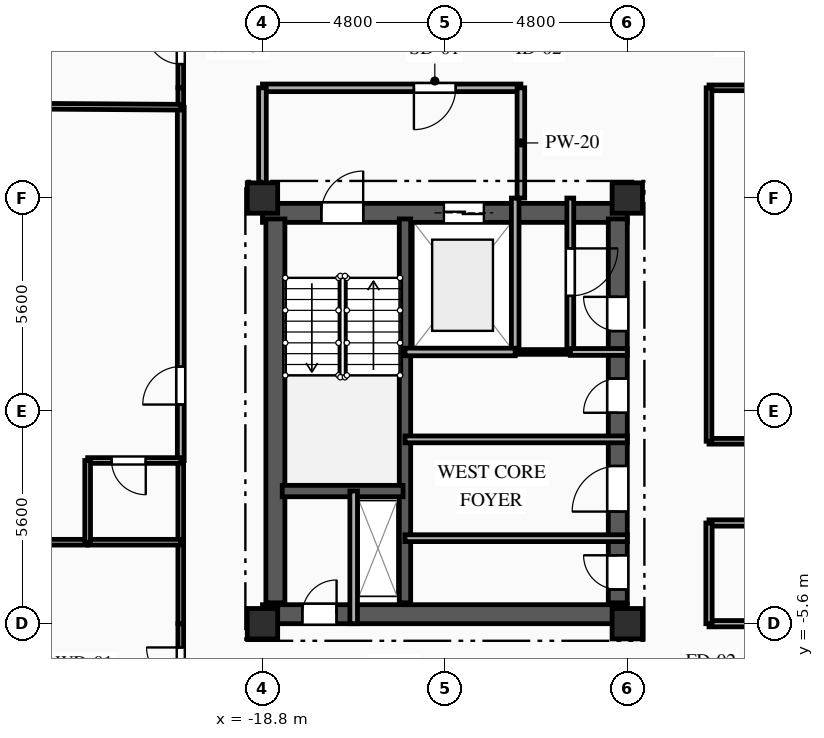
"""IFC4 building model, lengths in metres.
Left out: names, types, materials, properties, quantities, classifications, styles, units other than length and angle.
Written with IfcOpenShell. Run it as: python <this file> out.ifc"""

import sys

from ifc_helpers import new_model, si_unit, direction, frame, frame_2d, origin, origin_2d, place, context, subcontext, project, spatial, rectangle, extrude, element, fill, save


model = new_model("IFC4")
c1 = context("Model", 3, precision=1e-05, world=origin(), true_north=direction((0.0, 1.0)))
c2 = subcontext(c1, "Body", "Model", "MODEL_VIEW")
j1 = project(units=[si_unit("LENGTHUNIT", "METRE"), si_unit("PLANEANGLEUNIT", "RADIAN")], contexts=[c1])
p1 = place(None, origin())
s1 = spatial("IfcSite", under=j1, at=p1, CompositionType="ELEMENT")
p2 = place(p1, origin())
s2 = spatial("IfcBuilding", under=s1, at=p2, CompositionType="ELEMENT")
p3 = place(p2, frame((0.0, 0.0, 216.5)))
s3 = spatial("IfcBuildingStorey", under=s2, at=p3, CompositionType="ELEMENT", Elevation=216.5)
for number, where, z_axis, x_axis in (
    (1, (-18.8, -5.6, 0.0), (0.0, 0.0, 1.0), (1.0, 0.0, 0.0)),
    (2, (-18.8, 5.6, 0.0), (0.0, 0.0, 1.0), (1.0, 0.0, 0.0)),
    (3, (-9.2, -5.6, 0.0), (0.0, 0.0, 1.0), (1.0, 0.0, 0.0)),
    (4, (-9.2, 5.6, 0.0), (0.0, 0.0, 1.0), (1.0, 0.0, 0.0)),
):
    element("IfcColumn", number, at=place(p3, frame(where, z_axis=z_axis, x_axis=x_axis)), inside=s3, PredefinedType="COLUMN", context=c2, shape_type="SweptSolid", body=[
        extrude(rectangle(XDim=0.8, YDim=0.8, at=origin_2d()), origin(), (0.0, 0.0, 1.0), 3.35),
    ])
p4 = place(p3, frame((-18.8, 5.21, 0.0), z_axis=(0.0, 0.0, 1.0), x_axis=(1.0, 0.0, 0.0)))
e5 = element("IfcWall", 5, at=p4, inside=s3, PredefinedType="SHEAR", context=c2, shape_type="SweptSolid", body=[
    extrude(rectangle(XDim=9.6, YDim=0.5, at=frame_2d((4.8, 0.0))), origin(), (0.0, 0.0, 1.0), 3.04),
])
p5 = place(p4, frame((1.55, 0.0, 0.0)))
e6 = element("IfcOpeningElement", 6, at=p5, cuts=e5, PredefinedType="OPENING", context=c2, shape_type="SweptSolid", body=[
    extrude(rectangle(XDim=1.1, YDim=2.15, at=frame_2d((0.55, 1.075))), frame((0.0, 0.26, 0.0), z_axis=(0.0, -1.0, 0.0), x_axis=(1.0, 0.0, 0.0)), (0.0, 0.0, 1.0), 0.52),
])
p6 = place(p4, frame((4.775, 0.0, 0.0)))
e7 = element("IfcOpeningElement", 7, at=p6, cuts=e5, PredefinedType="OPENING", context=c2, shape_type="SweptSolid", body=[
    extrude(rectangle(XDim=1.05, YDim=2.1, at=frame_2d((0.525, 1.05))), frame((0.0, 0.26, 0.0), z_axis=(0.0, -1.0, 0.0), x_axis=(1.0, 0.0, 0.0)), (0.0, 0.0, 1.0), 0.52),
])
p7 = place(p3, frame((-18.8, -5.35, 0.0), z_axis=(0.0, 0.0, 1.0), x_axis=(1.0, 0.0, 0.0)))
e8 = element("IfcWall", 8, at=p7, inside=s3, PredefinedType="SHEAR", context=c2, shape_type="SweptSolid", body=[
    extrude(rectangle(XDim=9.6, YDim=0.5, at=frame_2d((4.8, 0.0))), origin(), (0.0, 0.0, 1.0), 3.04),
])
p8 = place(p7, frame((1.05, 0.0, 0.0)))
e9 = element("IfcOpeningElement", 9, at=p8, cuts=e8, PredefinedType="OPENING", context=c2, shape_type="SweptSolid", body=[
    extrude(rectangle(XDim=0.9, YDim=2.1, at=frame_2d((0.45, 1.05))), frame((0.0, 0.26, 0.0), z_axis=(0.0, -1.0, 0.0), x_axis=(1.0, 0.0, 0.0)), (0.0, 0.0, 1.0), 0.52),
])
p9 = place(p3, frame((-18.46, -5.05, 0.0), z_axis=(0.0, 0.0, 1.0), x_axis=(0.0, 1.0, 0.0)))
e10 = element("IfcWall", 10, at=p9, inside=s3, PredefinedType="SHEAR", context=c2, shape_type="SweptSolid", body=[
    extrude(rectangle(XDim=10.1, YDim=0.5, at=frame_2d((5.05, 0.0))), origin(), (0.0, 0.0, 1.0), 3.04),
])
p10 = place(p3, frame((-9.45, -5.05, 0.0), z_axis=(0.0, 0.0, 1.0), x_axis=(0.0, 1.0, 0.0)))
e11 = element("IfcWall", 11, at=p10, inside=s3, PredefinedType="SHEAR", context=c2, shape_type="SweptSolid", body=[
    extrude(rectangle(XDim=10.1, YDim=0.5, at=frame_2d((5.05, 0.0))), origin(), (0.0, 0.0, 1.0), 3.04),
])
p11 = place(p10, frame((7.15, 0.0, 0.0)))
e12 = element("IfcOpeningElement", 12, at=p11, cuts=e11, PredefinedType="OPENING", context=c2, shape_type="SweptSolid", body=[
    extrude(rectangle(XDim=0.9, YDim=2.1, at=frame_2d((0.45, 1.05))), frame((0.0, 0.26, 0.0), z_axis=(0.0, -1.0, 0.0), x_axis=(1.0, 0.0, 0.0)), (0.0, 0.0, 1.0), 0.52),
])
p12 = place(p10, frame((2.4, 0.0, 0.0)))
e13 = element("IfcOpeningElement", 13, at=p12, cuts=e11, PredefinedType="OPENING", context=c2, shape_type="SweptSolid", body=[
    extrude(rectangle(XDim=1.2, YDim=2.15, at=frame_2d((0.6, 1.075))), frame((0.0, 0.26, 0.0), z_axis=(0.0, -1.0, 0.0), x_axis=(1.0, 0.0, 0.0)), (0.0, 0.0, 1.0), 0.52),
])
p13 = place(p10, frame((0.35, 0.0, 0.0)))
e14 = element("IfcOpeningElement", 14, at=p13, cuts=e11, PredefinedType="OPENING", context=c2, shape_type="SweptSolid", body=[
    extrude(rectangle(XDim=0.9, YDim=2.1, at=frame_2d((0.45, 1.05))), frame((0.0, 0.26, 0.0), z_axis=(0.0, -1.0, 0.0), x_axis=(1.0, 0.0, 0.0)), (0.0, 0.0, 1.0), 0.52),
])
p14 = place(p10, frame((5.0, 0.0, 0.0)))
e15 = element("IfcOpeningElement", 15, at=p14, cuts=e11, PredefinedType="OPENING", context=c2, shape_type="SweptSolid", body=[
    extrude(rectangle(XDim=0.9, YDim=2.1, at=frame_2d((0.45, 1.05))), frame((0.0, 0.26, 0.0), z_axis=(0.0, -1.0, 0.0), x_axis=(1.0, 0.0, 0.0)), (0.0, 0.0, 1.0), 0.52),
])
p15 = place(p3, frame((-15.05, -5.05, 0.0), z_axis=(0.0, 0.0, 1.0), x_axis=(0.0, 1.0, 0.0)))
e16 = element("IfcWall", 16, at=p15, inside=s3, PredefinedType="SHEAR", context=c2, shape_type="SweptSolid", body=[
    extrude(rectangle(XDim=10.1, YDim=0.3, at=frame_2d((5.05, 0.0))), origin(), (0.0, 0.0, 1.0), 3.04),
])
p16 = place(p3, frame((-18.28, -2.11, 0.0), z_axis=(0.0, 0.0, 1.0), x_axis=(1.0, 0.0, 0.0)))
e17 = element("IfcWall", 17, at=p16, inside=s3, PredefinedType="SHEAR", context=c2, shape_type="SweptSolid", body=[
    extrude(rectangle(XDim=3.18, YDim=0.3, at=frame_2d((1.59, 0.0))), origin(), (0.0, 0.0, 1.0), 3.04),
])
p17 = place(p3, frame((-16.4, -5.6, 0.0), z_axis=(0.0, 0.0, 1.0), x_axis=(0.0, 1.0, 0.0)))
e18 = element("IfcWall", 18, at=p17, inside=s3, PredefinedType="PARTITIONING", context=c2, shape_type="SweptSolid", body=[
    extrude(rectangle(XDim=3.49, YDim=0.2, at=frame_2d((1.745, 0.0))), origin(), (0.0, 0.0, 1.0), 3.04),
])
p18 = place(p3, frame((-12.15, 1.55, 0.0), z_axis=(0.0, 0.0, 1.0), x_axis=(0.0, 1.0, 0.0)))
e19 = element("IfcWall", 19, at=p18, inside=s3, PredefinedType="PARTITIONING", context=c2, shape_type="SweptSolid", body=[
    extrude(rectangle(XDim=4.05, YDim=0.2, at=frame_2d((2.025, 0.0))), origin(), (0.0, 0.0, 1.0), 3.04),
])
p19 = place(p3, frame((-12.0, 8.5, 0.0), z_axis=(0.0, 0.0, 1.0), x_axis=(-1.0, 0.0, 0.0)))
e20 = element("IfcWall", 20, at=p19, inside=s3, PredefinedType="PARTITIONING", context=c2, shape_type="SweptSolid", body=[
    extrude(rectangle(XDim=6.8, YDim=0.2, at=frame_2d((3.4, 0.0))), origin(), (0.0, 0.0, 1.0), 3.04),
])
p20 = place(p19, frame((1.715, 0.0, 0.0)))
e21 = element("IfcOpeningElement", 21, at=p20, cuts=e20, PredefinedType="OPENING", context=c2, shape_type="SweptSolid", body=[
    extrude(rectangle(XDim=1.1, YDim=2.15, at=frame_2d((0.55, 1.075))), frame((0.0, 0.11, 0.0), z_axis=(0.0, -1.0, 0.0), x_axis=(1.0, 0.0, 0.0)), (0.0, 0.0, 1.0), 0.22),
])
p21 = place(p3, frame((-18.8, 8.5, 0.0), z_axis=(0.0, 0.0, 1.0), x_axis=(0.0, -1.0, 0.0)))
e22 = element("IfcWall", 22, at=p21, inside=s3, PredefinedType="PARTITIONING", context=c2, shape_type="SweptSolid", body=[
    extrude(rectangle(XDim=2.9, YDim=0.2, at=frame_2d((1.45, 0.0))), origin(), (0.0, 0.0, 1.0), 2.665),
])
p22 = place(p3, frame((-12.0, 5.6, 0.0), z_axis=(0.0, 0.0, 1.0), x_axis=(0.0, 1.0, 0.0)))
e23 = element("IfcWall", 23, at=p22, inside=s3, PredefinedType="PARTITIONING", context=c2, shape_type="SweptSolid", body=[
    extrude(rectangle(XDim=2.9, YDim=0.2, at=frame_2d((1.45, 0.0))), origin(), (0.0, 0.0, 1.0), 3.04),
])
p23 = place(p3, frame((-10.7, 5.6, 0.0), z_axis=(0.0, 0.0, 1.0), x_axis=(0.0, -1.0, 0.0)))
e24 = element("IfcWall", 24, at=p23, inside=s3, PredefinedType="PARTITIONING", context=c2, shape_type="SweptSolid", body=[
    extrude(rectangle(XDim=4.05, YDim=0.18, at=frame_2d((2.025, 0.0))), origin(), (0.0, 0.0, 1.0), 3.04),
])
p24 = place(p23, frame((1.325, 0.0, 0.0)))
e25 = element("IfcOpeningElement", 25, at=p24, cuts=e24, PredefinedType="OPENING", context=c2, shape_type="SweptSolid", body=[
    extrude(rectangle(XDim=1.25, YDim=2.2, at=frame_2d((0.625, 1.1))), frame((0.0, 0.1, 0.0), z_axis=(0.0, -1.0, 0.0), x_axis=(1.0, 0.0, 0.0)), (0.0, 0.0, 1.0), 0.2),
])
p25 = place(p3, frame((-10.7, 1.55, 0.0), z_axis=(0.0, 0.0, 1.0), x_axis=(1.0, 0.0, 0.0)))
e26 = element("IfcWall", 26, at=p25, inside=s3, PredefinedType="PARTITIONING", context=c2, shape_type="SweptSolid", body=[
    extrude(rectangle(XDim=1.5, YDim=0.18, at=frame_2d((0.75, 0.0))), origin(), (0.0, 0.0, 1.0), 3.04),
])
p26 = place(p3, frame((-12.15, 1.55, 0.0), z_axis=(0.0, 0.0, 1.0), x_axis=(1.0, 0.0, 0.0)))
e27 = element("IfcWall", 27, at=p26, inside=s3, PredefinedType="PARTITIONING", context=c2, shape_type="SweptSolid", body=[
    extrude(rectangle(XDim=1.45, YDim=0.125, at=frame_2d((0.725, 0.0))), origin(), (0.0, 0.0, 1.0), 3.04),
])
p27 = place(p3, frame((-15.05, -3.35, 0.0), z_axis=(0.0, 0.0, 1.0), x_axis=(1.0, 0.0, 0.0)))
e28 = element("IfcWall", 28, at=p27, inside=s3, PredefinedType="PARTITIONING", context=c2, shape_type="SweptSolid", body=[
    extrude(rectangle(XDim=5.85, YDim=0.18, at=frame_2d((2.925, 0.0))), origin(), (0.0, 0.0, 1.0), 2.755),
])
p28 = place(p3, frame((-9.2, -0.75, 0.0), z_axis=(0.0, 0.0, 1.0), x_axis=(-1.0, 0.0, 0.0)))
e29 = element("IfcWall", 29, at=p28, inside=s3, PredefinedType="PARTITIONING", context=c2, shape_type="SweptSolid", body=[
    extrude(rectangle(XDim=5.85, YDim=0.18, at=frame_2d((2.925, 0.0))), origin(), (0.0, 0.0, 1.0), 3.04),
])
p29 = place(p3, frame((-20.95, 8.5, 0.0), z_axis=(0.0, 0.0, 1.0), x_axis=(0.0, 1.0, 0.0)))
e30 = element("IfcWall", 30, at=p29, inside=s3, PredefinedType="PARTITIONING", context=c2, shape_type="SweptSolid", body=[
    extrude(rectangle(XDim=2.15, YDim=0.15, at=frame_2d((1.075, 0.0))), origin(), (0.0, 0.0, 1.0), 3.04),
])
p30 = place(p29, frame((0.625, 0.0, 0.0)))
e31 = element("IfcOpeningElement", 31, at=p30, cuts=e30, PredefinedType="OPENING", context=c2, shape_type="SweptSolid", body=[
    extrude(rectangle(XDim=0.9, YDim=2.1, at=frame_2d((0.45, 1.05))), frame((0.0, 0.085, 0.0), z_axis=(0.0, -1.0, 0.0), x_axis=(1.0, 0.0, 0.0)), (0.0, 0.0, 1.0), 0.17),
])
p31 = place(p3, frame((0.0, 8.5, 0.0), z_axis=(0.0, 0.0, 1.0), x_axis=(-1.0, 0.0, 0.0)))
e32 = element("IfcWall", 32, at=p31, inside=s3, PredefinedType="PARTITIONING", context=c2, shape_type="SweptSolid", body=[
    extrude(rectangle(XDim=7.05, YDim=0.15, at=frame_2d((3.525, 0.0))), origin(), (0.0, 0.0, 1.0), 3.04),
])
p32 = place(p3, frame((-20.95, -7.75, 0.0), z_axis=(0.0, 0.0, 1.0), x_axis=(0.0, 1.0, 0.0)))
e33 = element("IfcWall", 33, at=p32, inside=s3, PredefinedType="PARTITIONING", context=c2, shape_type="SweptSolid", body=[
    extrude(rectangle(XDim=2.15, YDim=0.15, at=frame_2d((1.075, 0.0))), origin(), (0.0, 0.0, 1.0), 3.04),
])
p33 = place(p32, frame((0.625, 0.0, 0.0)))
e34 = element("IfcOpeningElement", 34, at=p33, cuts=e33, PredefinedType="OPENING", context=c2, shape_type="SweptSolid", body=[
    extrude(rectangle(XDim=0.9, YDim=2.1, at=frame_2d((0.45, 1.05))), frame((0.0, 0.085, 0.0), z_axis=(0.0, -1.0, 0.0), x_axis=(1.0, 0.0, 0.0)), (0.0, 0.0, 1.0), 0.17),
])
p34 = place(p3, frame((-7.05, -5.6, 0.0), z_axis=(0.0, 0.0, 1.0), x_axis=(1.0, 0.0, 0.0)))
e35 = element("IfcWall", 35, at=p34, inside=s3, PredefinedType="PARTITIONING", context=c2, shape_type="SweptSolid", body=[
    extrude(rectangle(XDim=7.05, YDim=0.165, at=frame_2d((3.525, 0.0))), origin(), (0.0, 0.0, 1.0), 2.525),
])
p35 = place(p3, frame((-20.95, -5.6, 0.0), z_axis=(0.0, 0.0, 1.0), x_axis=(0.0, 1.0, 0.0)))
e36 = element("IfcWall", 36, at=p35, inside=s3, PredefinedType="PARTITIONING", context=c2, shape_type="SweptSolid", body=[
    extrude(rectangle(XDim=2.144, YDim=0.15, at=frame_2d((1.072, 0.0))), origin(), (0.0, 0.0, 1.0), 3.04),
])
p36 = place(p3, frame((-20.95, -1.306, 0.0), z_axis=(0.0, 0.0, 1.0), x_axis=(0.0, 1.0, 0.0)))
e37 = element("IfcWall", 37, at=p36, inside=s3, PredefinedType="PARTITIONING", context=c2, shape_type="SweptSolid", body=[
    extrude(rectangle(XDim=9.296, YDim=0.18, at=frame_2d((4.648, 0.0))), origin(), (0.0, 0.0, 1.0), 3.04),
])
p37 = place(p36, frame((1.472, 0.0, 0.0)))
e38 = element("IfcOpeningElement", 38, at=p37, cuts=e37, PredefinedType="OPENING", context=c2, shape_type="SweptSolid", body=[
    extrude(rectangle(XDim=1.0, YDim=2.15, at=frame_2d((0.5, 1.075))), frame((0.0, 0.1, 0.0), z_axis=(0.0, -1.0, 0.0), x_axis=(1.0, 0.0, 0.0)), (0.0, 0.0, 1.0), 0.2),
])
p38 = place(p3, frame((-20.95, -3.456, 0.0), z_axis=(0.0, 0.0, 1.0), x_axis=(0.0, 1.0, 0.0)))
e39 = element("IfcWall", 39, at=p38, inside=s3, PredefinedType="PLUMBINGWALL", context=c2, shape_type="SweptSolid", body=[
    extrude(rectangle(XDim=2.15, YDim=0.15, at=frame_2d((1.075, 0.0))), origin(), (0.0, 0.0, 1.0), 3.04),
])
p39 = place(p3, frame((-20.95, 7.99, 0.0), z_axis=(0.0, 0.0, 1.0), x_axis=(0.0, 1.0, 0.0)))
e40 = element("IfcWall", 40, at=p39, inside=s3, PredefinedType="PARTITIONING", context=c2, shape_type="SweptSolid", body=[
    extrude(rectangle(XDim=0.51, YDim=0.15, at=frame_2d((0.255, 0.0))), origin(), (0.0, 0.0, 1.0), 3.04),
])
p40 = place(p3, frame((-7.05, -0.8, 0.0), z_axis=(0.0, 0.0, 1.0), x_axis=(1.0, 0.0, 0.0)))
e41 = element("IfcWall", 41, at=p40, inside=s3, PredefinedType="PARTITIONING", context=c2, shape_type="SweptSolid", body=[
    extrude(rectangle(XDim=14.1, YDim=0.15, at=frame_2d((7.05, 0.0))), origin(), (0.0, 0.0, 1.0), 3.04),
])
p41 = place(p40, frame((6.525, 0.0, 0.0)))
e42 = element("IfcOpeningElement", 42, at=p41, cuts=e41, PredefinedType="OPENING", context=c2, shape_type="SweptSolid", body=[
    extrude(rectangle(XDim=1.05, YDim=2.15, at=frame_2d((0.525, 1.075))), frame((0.0, 0.085, 0.0), z_axis=(0.0, -1.0, 0.0), x_axis=(1.0, 0.0, 0.0)), (0.0, 0.0, 1.0), 0.17),
])
p42 = place(p3, frame((7.05, -2.95, 0.0), z_axis=(0.0, 0.0, 1.0), x_axis=(-1.0, 0.0, 0.0)))
e43 = element("IfcWall", 43, at=p42, inside=s3, PredefinedType="PARTITIONING", context=c2, shape_type="SweptSolid", body=[
    extrude(rectangle(XDim=14.1, YDim=0.165, at=frame_2d((7.05, 0.0))), origin(), (0.0, 0.0, 1.0), 3.04),
])
p43 = place(p42, frame((6.475, 0.0, 0.0)))
e44 = element("IfcOpeningElement", 44, at=p43, cuts=e43, PredefinedType="OPENING", context=c2, shape_type="SweptSolid", body=[
    extrude(rectangle(XDim=1.15, YDim=2.15, at=frame_2d((0.575, 1.075))), frame((0.0, 0.093, 0.0), z_axis=(0.0, -1.0, 0.0), x_axis=(1.0, 0.0, 0.0)), (0.0, 0.0, 1.0), 0.185),
])
p44 = place(p3, frame((-7.05, 8.5, 0.0), z_axis=(0.0, 0.0, 1.0), x_axis=(0.0, -1.0, 0.0)))
e45 = element("IfcWall", 45, at=p44, inside=s3, PredefinedType="PARTITIONING", context=c2, shape_type="SweptSolid", body=[
    extrude(rectangle(XDim=9.3, YDim=0.15, at=frame_2d((4.65, 0.0))), origin(), (0.0, 0.0, 1.0), 3.04),
])
p45 = place(p3, frame((-7.05, -2.95, 0.0), z_axis=(0.0, 0.0, 1.0), x_axis=(0.0, -1.0, 0.0)))
e46 = element("IfcWall", 46, at=p45, inside=s3, PredefinedType="PARTITIONING", context=c2, shape_type="SweptSolid", body=[
    extrude(rectangle(XDim=2.65, YDim=0.165, at=frame_2d((1.325, 0.0))), origin(), (0.0, 0.0, 1.0), 3.04),
])
p46 = place(p3, frame((-24.976, -3.456, 0.0), z_axis=(0.0, 0.0, 1.0), x_axis=(1.0, 0.0, 0.0)))
e47 = element("IfcWall", 47, at=p46, inside=s3, PredefinedType="PARTITIONING", context=c2, shape_type="SweptSolid", body=[
    extrude(rectangle(XDim=1.576, YDim=0.15, at=frame_2d((0.788, 0.0))), origin(), (0.0, 0.0, 1.0), 3.04),
])
p47 = place(p3, frame((-23.4, -3.456, 0.0), z_axis=(0.0, 0.0, 1.0), x_axis=(1.0, 0.0, 0.0)))
e48 = element("IfcWall", 48, at=p47, inside=s3, PredefinedType="PLUMBINGWALL", context=c2, shape_type="SweptSolid", body=[
    extrude(rectangle(XDim=2.45, YDim=0.15, at=frame_2d((1.225, 0.0))), origin(), (0.0, 0.0, 1.0), 3.04),
])
p48 = place(p3, frame((-20.95, -1.306, 0.0), z_axis=(0.0, 0.0, 1.0), x_axis=(-1.0, 0.0, 0.0)))
e49 = element("IfcWall", 49, at=p48, inside=s3, PredefinedType="PLUMBINGWALL", context=c2, shape_type="SweptSolid", body=[
    extrude(rectangle(XDim=2.45, YDim=0.15, at=frame_2d((1.225, 0.0))), origin(), (0.0, 0.0, 1.0), 3.04),
])
p49 = place(p48, frame((0.921, 0.0, 0.0)))
e50 = element("IfcOpeningElement", 50, at=p49, cuts=e49, PredefinedType="OPENING", context=c2, shape_type="SweptSolid", body=[
    extrude(rectangle(XDim=0.9, YDim=2.1, at=frame_2d((0.45, 1.05))), frame((0.0, 0.085, 0.0), z_axis=(0.0, -1.0, 0.0), x_axis=(1.0, 0.0, 0.0)), (0.0, 0.0, 1.0), 0.17),
])
p50 = place(p3, frame((-23.4, -1.306, 0.0), z_axis=(0.0, 0.0, 1.0), x_axis=(0.0, -1.0, 0.0)))
e51 = element("IfcWall", 51, at=p50, inside=s3, PredefinedType="PLUMBINGWALL", context=c2, shape_type="SweptSolid", body=[
    extrude(rectangle(XDim=2.15, YDim=0.15, at=frame_2d((1.075, 0.0))), origin(), (0.0, 0.0, 1.0), 2.695),
])
p51 = place(p3, frame((-27.419, 8.034, 0.0), z_axis=(0.0, 0.0, 1.0), x_axis=(0.999976928608, -0.006792808784, 0.0)))
e52 = element("IfcWall", 52, at=p51, inside=s3, PredefinedType="PARTITIONING", context=c2, shape_type="SweptSolid", body=[
    extrude(rectangle(XDim=6.469, YDim=0.15, at=frame_2d((3.235, 0.0))), origin(), (0.0, 0.0, 1.0), 3.04),
])
p52 = place(p3, frame((-15.05, 1.55, 0.0), z_axis=(0.0, 0.0, 1.0), x_axis=(1.0, 0.0, 0.0)))
e53 = element("IfcWall", 53, at=p52, inside=s3, PredefinedType="PARTITIONING", context=c2, shape_type="SweptSolid", body=[
    extrude(rectangle(XDim=2.9, YDim=0.2, at=frame_2d((1.45, 0.0))), origin(), (0.0, 0.0, 1.0), 3.04),
])
p53 = place(p5, origin())
e54 = element("IfcDoor", 54, at=p53, inside=s3, OperationType="SINGLE_SWING_RIGHT", PredefinedType="DOOR", context=c2, shape_type="SweptSolid", body=[
    extrude(rectangle(XDim=1.1, YDim=2.15, at=frame_2d((0.55, 1.075))), frame((0.0, 0.025, 0.0), z_axis=(0.0, -1.0, 0.0), x_axis=(1.0, 0.0, 0.0)), (0.0, 0.0, 1.0), 0.05),
])
fill(e6, e54)
p54 = place(p6, origin())
e55 = element("IfcDoor", 55, at=p54, inside=s3, OperationType="DOUBLE_DOOR_SLIDING", PredefinedType="DOOR", context=c2, shape_type="SweptSolid", body=[
    extrude(rectangle(XDim=1.05, YDim=2.1, at=frame_2d((0.525, 1.05))), frame((0.0, 0.025, 0.0), z_axis=(0.0, -1.0, 0.0), x_axis=(1.0, 0.0, 0.0)), (0.0, 0.0, 1.0), 0.05),
])
fill(e7, e55)
p55 = place(p8, origin())
e56 = element("IfcDoor", 56, at=p55, inside=s3, OperationType="SINGLE_SWING_RIGHT", PredefinedType="DOOR", context=c2, shape_type="SweptSolid", body=[
    extrude(rectangle(XDim=0.9, YDim=2.1, at=frame_2d((0.45, 1.05))), frame((0.0, 0.025, 0.0), z_axis=(0.0, -1.0, 0.0), x_axis=(1.0, 0.0, 0.0)), (0.0, 0.0, 1.0), 0.05),
])
fill(e9, e56)
p56 = place(p20, origin())
e57 = element("IfcDoor", 57, at=p56, inside=s3, OperationType="SINGLE_SWING_RIGHT", PredefinedType="DOOR", context=c2, shape_type="SweptSolid", body=[
    extrude(rectangle(XDim=1.1, YDim=2.15, at=frame_2d((0.55, 1.075))), frame((0.0, 0.025, 0.0), z_axis=(0.0, -1.0, 0.0), x_axis=(1.0, 0.0, 0.0)), (0.0, 0.0, 1.0), 0.05),
])
fill(e21, e57)
p57 = place(p24, origin())
e58 = element("IfcDoor", 58, at=p57, inside=s3, OperationType="SINGLE_SWING_LEFT", PredefinedType="DOOR", context=c2, shape_type="SweptSolid", body=[
    extrude(rectangle(XDim=1.25, YDim=2.2, at=frame_2d((0.625, 1.1))), frame((0.0, 0.025, 0.0), z_axis=(0.0, -1.0, 0.0), x_axis=(1.0, 0.0, 0.0)), (0.0, 0.0, 1.0), 0.05),
])
fill(e25, e58)
p58 = place(p11, origin())
e59 = element("IfcDoor", 59, at=p58, inside=s3, OperationType="SINGLE_SWING_RIGHT", PredefinedType="DOOR", context=c2, shape_type="SweptSolid", body=[
    extrude(rectangle(XDim=0.9, YDim=2.1, at=frame_2d((0.45, 1.05))), frame((0.0, 0.025, 0.0), z_axis=(0.0, -1.0, 0.0), x_axis=(1.0, 0.0, 0.0)), (0.0, 0.0, 1.0), 0.05),
])
fill(e12, e59)
p59 = place(p12, origin())
e60 = element("IfcDoor", 60, at=p59, inside=s3, OperationType="SINGLE_SWING_LEFT", PredefinedType="DOOR", context=c2, shape_type="SweptSolid", body=[
    extrude(rectangle(XDim=1.2, YDim=2.15, at=frame_2d((0.6, 1.075))), frame((0.0, 0.025, 0.0), z_axis=(0.0, -1.0, 0.0), x_axis=(1.0, 0.0, 0.0)), (0.0, 0.0, 1.0), 0.05),
])
fill(e13, e60)
p60 = place(p13, origin())
e61 = element("IfcDoor", 61, at=p60, inside=s3, OperationType="SINGLE_SWING_RIGHT", PredefinedType="DOOR", context=c2, shape_type="SweptSolid", body=[
    extrude(rectangle(XDim=0.9, YDim=2.1, at=frame_2d((0.45, 1.05))), frame((0.0, 0.025, 0.0), z_axis=(0.0, -1.0, 0.0), x_axis=(1.0, 0.0, 0.0)), (0.0, 0.0, 1.0), 0.05),
])
fill(e14, e61)
p61 = place(p14, origin())
e62 = element("IfcDoor", 62, at=p61, inside=s3, OperationType="SINGLE_SWING_LEFT", PredefinedType="DOOR", context=c2, shape_type="SweptSolid", body=[
    extrude(rectangle(XDim=0.9, YDim=2.1, at=frame_2d((0.45, 1.05))), frame((0.0, 0.025, 0.0), z_axis=(0.0, -1.0, 0.0), x_axis=(1.0, 0.0, 0.0)), (0.0, 0.0, 1.0), 0.05),
])
fill(e15, e62)
p62 = place(p30, origin())
e63 = element("IfcDoor", 63, at=p62, inside=s3, OperationType="SINGLE_SWING_RIGHT", PredefinedType="DOOR", context=c2, shape_type="SweptSolid", body=[
    extrude(rectangle(XDim=0.9, YDim=2.1, at=frame_2d((0.45, 1.05))), frame((0.0, 0.025, 0.0), z_axis=(0.0, -1.0, 0.0), x_axis=(1.0, 0.0, 0.0)), (0.0, 0.0, 1.0), 0.05),
])
fill(e31, e63)
p63 = place(p33, origin())
e64 = element("IfcDoor", 64, at=p63, inside=s3, OperationType="SINGLE_SWING_RIGHT", PredefinedType="DOOR", context=c2, shape_type="SweptSolid", body=[
    extrude(rectangle(XDim=0.9, YDim=2.1, at=frame_2d((0.45, 1.05))), frame((0.0, 0.025, 0.0), z_axis=(0.0, -1.0, 0.0), x_axis=(1.0, 0.0, 0.0)), (0.0, 0.0, 1.0), 0.05),
])
fill(e34, e64)
p64 = place(p37, origin())
e65 = element("IfcDoor", 65, at=p64, inside=s3, OperationType="SINGLE_SWING_LEFT", PredefinedType="DOOR", context=c2, shape_type="SweptSolid", body=[
    extrude(rectangle(XDim=1.0, YDim=2.15, at=frame_2d((0.5, 1.075))), frame((0.0, 0.025, 0.0), z_axis=(0.0, -1.0, 0.0), x_axis=(1.0, 0.0, 0.0)), (0.0, 0.0, 1.0), 0.05),
])
fill(e38, e65)
p65 = place(p49, origin())
e66 = element("IfcDoor", 66, at=p65, inside=s3, OperationType="SINGLE_SWING_LEFT", PredefinedType="DOOR", context=c2, shape_type="SweptSolid", body=[
    extrude(rectangle(XDim=0.9, YDim=2.1, at=frame_2d((0.45, 1.05))), frame((0.0, 0.025, 0.0), z_axis=(0.0, -1.0, 0.0), x_axis=(1.0, 0.0, 0.0)), (0.0, 0.0, 1.0), 0.05),
])
fill(e50, e66)
save(model, sys.argv[1])
